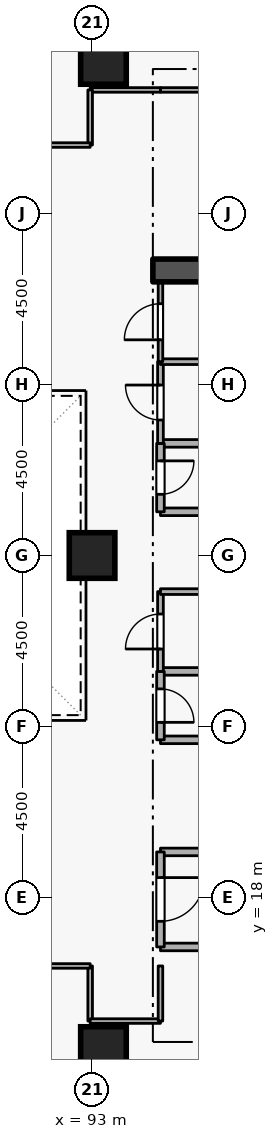
"""IFC4 building model, lengths in metres.
Left out: names, types, materials, properties, quantities, classifications, styles, units other than length and angle.
Written with IfcOpenShell. Run it as: python <this file> out.ifc"""

import sys

from ifc_helpers import new_model, si_unit, direction, frame, frame_2d, origin, origin_2d, place, context, subcontext, project, spatial, rectangle, extrude, element, fill, save


model = new_model("IFC4")
c1 = context("Model", 3, precision=1e-05, world=origin(), true_north=direction((0.0, 1.0)))
c2 = subcontext(c1, "Body", "Model", "MODEL_VIEW")
j1 = project(units=[si_unit("LENGTHUNIT", "METRE"), si_unit("PLANEANGLEUNIT", "RADIAN")], contexts=[c1])
p1 = place(None, origin())
s1 = spatial("IfcSite", under=j1, at=p1, CompositionType="ELEMENT")
p2 = place(p1, origin())
s2 = spatial("IfcBuilding", under=s1, at=p2, CompositionType="ELEMENT")
p3 = place(p2, frame((0.0, 0.0, 98.1)))
s3 = spatial("IfcBuildingStorey", under=s2, at=p3, CompositionType="ELEMENT", Elevation=98.1)
p4 = place(p3, frame((94.6, 34.5, 0.0), z_axis=(0.0, 0.0, 1.0), x_axis=(1.0, 0.0, 0.0)))
e1 = element("IfcWall", 1, at=p4, inside=s3, PredefinedType="SHEAR", context=c2, shape_type="SweptSolid", body=[
    extrude(rectangle(XDim=5.7, YDim=0.6, at=frame_2d((2.85, 0.0))), origin(), (0.0, 0.0, 1.0), 3.6),
])
for number, where, z_axis, x_axis in (
    (2, (93.3, 14.0, 0.0), (0.0, 0.0, 1.0), (1.0, 0.0, 0.0)),
    (3, (93.3, 40.0, 0.0), (0.0, 0.0, 1.0), (1.0, 0.0, 0.0)),
    (4, (93.0, 27.0, 0.0), (0.0, 0.0, 1.0), (1.0, 0.0, 0.0)),
):
    element("IfcColumn", number, at=place(p3, frame(where, z_axis=z_axis, x_axis=x_axis)), inside=s3, PredefinedType="COLUMN", context=c2, shape_type="SweptSolid", body=[
        extrude(rectangle(XDim=1.2, YDim=1.2, at=origin_2d()), origin(), (0.0, 0.0, 1.0), 3.6),
    ])
p5 = place(p3, frame((94.8, 16.7, 0.0), z_axis=(0.0, 0.0, 1.0), x_axis=(1.0, 0.0, 0.0)))
e5 = element("IfcWall", 5, at=p5, inside=s3, PredefinedType="STANDARD", context=c2, shape_type="SweptSolid", body=[
    extrude(rectangle(XDim=5.7, YDim=0.2, at=frame_2d((2.85, 0.0))), origin(), (0.0, 0.0, 1.0), 3.3),
])
p6 = place(p3, frame((97.1, 19.2, 0.0), z_axis=(0.0, 0.0, 1.0), x_axis=(-1.0, 0.0, 0.0)))
e6 = element("IfcWall", 6, at=p6, inside=s3, PredefinedType="STANDARD", context=c2, shape_type="SweptSolid", body=[
    extrude(rectangle(XDim=2.3, YDim=0.2, at=frame_2d((1.15, 0.0))), origin(), (0.0, 0.0, 1.0), 2.505),
])
p7 = place(p3, frame((94.8, 19.2, 0.0), z_axis=(0.0, 0.0, 1.0), x_axis=(0.0, -1.0, 0.0)))
e7 = element("IfcWall", 7, at=p7, inside=s3, PredefinedType="STANDARD", context=c2, shape_type="SweptSolid", body=[
    extrude(rectangle(XDim=2.5, YDim=0.2, at=frame_2d((1.25, 0.0))), origin(), (0.0, 0.0, 1.0), 3.3),
])
p8 = place(p7, frame((0.675, 0.0, 0.0)))
e8 = element("IfcOpeningElement", 8, at=p8, cuts=e7, PredefinedType="OPENING", context=c2, shape_type="SweptSolid", body=[
    extrude(rectangle(XDim=1.15, YDim=2.1, at=frame_2d((0.575, 1.05))), frame((0.0, 0.11, 0.0), z_axis=(0.0, -1.0, 0.0), x_axis=(1.0, 0.0, 0.0)), (0.0, 0.0, 1.0), 0.22),
])
for number, where, z_axis, x_axis in (
    (9, (94.8, 28.15, 0.0), (0.0, 0.0, 1.0), (1.0, 0.0, 0.0)),
    (10, (96.85, 29.95, 0.0), (0.0, 0.0, 1.0), (-1.0, 0.0, 0.0)),
):
    element("IfcWall", number, at=place(p3, frame(where, z_axis=z_axis, x_axis=x_axis)), inside=s3, PredefinedType="STANDARD", context=c2, shape_type="SweptSolid", body=[
        extrude(rectangle(XDim=2.05, YDim=0.2, at=frame_2d((1.025, 0.0))), origin(), (0.0, 0.0, 1.0), 3.3),
    ])
p9 = place(p3, frame((94.8, 29.95, 0.0), z_axis=(0.0, 0.0, 1.0), x_axis=(0.0, -1.0, 0.0)))
e11 = element("IfcWall", 11, at=p9, inside=s3, PredefinedType="STANDARD", context=c2, shape_type="SweptSolid", body=[
    extrude(rectangle(XDim=1.8, YDim=0.2, at=frame_2d((0.9, 0.0))), origin(), (0.0, 0.0, 1.0), 3.3),
])
p10 = place(p9, frame((0.46, 0.0, 0.0)))
e12 = element("IfcOpeningElement", 12, at=p10, cuts=e11, PredefinedType="OPENING", context=c2, shape_type="SweptSolid", body=[
    extrude(rectangle(XDim=0.88, YDim=2.04, at=frame_2d((0.44, 1.02))), frame((0.0, 0.11, 0.0), z_axis=(0.0, -1.0, 0.0), x_axis=(1.0, 0.0, 0.0)), (0.0, 0.0, 1.0), 0.22),
])
for number, where, z_axis, x_axis in (
    (13, (94.8, 22.15, 0.0), (0.0, 0.0, 1.0), (1.0, 0.0, 0.0)),
    (14, (96.85, 23.95, 0.0), (0.0, 0.0, 1.0), (-1.0, 0.0, 0.0)),
):
    element("IfcWall", number, at=place(p3, frame(where, z_axis=z_axis, x_axis=x_axis)), inside=s3, PredefinedType="STANDARD", context=c2, shape_type="SweptSolid", body=[
        extrude(rectangle(XDim=2.05, YDim=0.2, at=frame_2d((1.025, 0.0))), origin(), (0.0, 0.0, 1.0), 3.3),
    ])
p11 = place(p3, frame((94.8, 23.95, 0.0), z_axis=(0.0, 0.0, 1.0), x_axis=(0.0, -1.0, 0.0)))
e15 = element("IfcWall", 15, at=p11, inside=s3, PredefinedType="STANDARD", context=c2, shape_type="SweptSolid", body=[
    extrude(rectangle(XDim=1.8, YDim=0.2, at=frame_2d((0.9, 0.0))), origin(), (0.0, 0.0, 1.0), 3.3),
])
p12 = place(p11, frame((0.46, 0.0, 0.0)))
e16 = element("IfcOpeningElement", 16, at=p12, cuts=e15, PredefinedType="OPENING", context=c2, shape_type="SweptSolid", body=[
    extrude(rectangle(XDim=0.88, YDim=2.04, at=frame_2d((0.44, 1.02))), frame((0.0, 0.11, 0.0), z_axis=(0.0, -1.0, 0.0), x_axis=(1.0, 0.0, 0.0)), (0.0, 0.0, 1.0), 0.22),
])
p13 = place(p3, frame((94.8, 23.95, 0.0), z_axis=(0.0, 0.0, 1.0), x_axis=(0.0, 1.0, 0.0)))
e17 = element("IfcWall", 17, at=p13, inside=s3, PredefinedType="PARTITIONING", context=c2, shape_type="SweptSolid", body=[
    extrude(rectangle(XDim=2.1, YDim=0.15, at=frame_2d((1.05, 0.0))), origin(), (0.0, 0.0, 1.0), 3.3),
])
p14 = place(p13, frame((0.59, 0.0, 0.0)))
e18 = element("IfcOpeningElement", 18, at=p14, cuts=e17, PredefinedType="OPENING", context=c2, shape_type="SweptSolid", body=[
    extrude(rectangle(XDim=0.92, YDim=2.08, at=frame_2d((0.46, 1.04))), frame((0.0, 0.085, 0.0), z_axis=(0.0, -1.0, 0.0), x_axis=(1.0, 0.0, 0.0)), (0.0, 0.0, 1.0), 0.17),
])
p15 = place(p3, frame((94.8, 26.05, 0.0), z_axis=(0.0, 0.0, 1.0), x_axis=(1.0, 0.0, 0.0)))
e19 = element("IfcWall", 19, at=p15, inside=s3, PredefinedType="PARTITIONING", context=c2, shape_type="SweptSolid", body=[
    extrude(rectangle(XDim=2.05, YDim=0.15, at=frame_2d((1.025, 0.0))), origin(), (0.0, 0.0, 1.0), 3.3),
])
p16 = place(p3, frame((94.8, 29.95, 0.0), z_axis=(0.0, 0.0, 1.0), x_axis=(0.0, 1.0, 0.0)))
e20 = element("IfcWall", 20, at=p16, inside=s3, PredefinedType="PARTITIONING", context=c2, shape_type="SweptSolid", body=[
    extrude(rectangle(XDim=2.15, YDim=0.15, at=frame_2d((1.075, 0.0))), origin(), (0.0, 0.0, 1.0), 3.3),
])
p17 = place(p16, frame((0.615, 0.0, 0.0)))
e21 = element("IfcOpeningElement", 21, at=p17, cuts=e20, PredefinedType="OPENING", context=c2, shape_type="SweptSolid", body=[
    extrude(rectangle(XDim=0.92, YDim=2.08, at=frame_2d((0.46, 1.04))), frame((0.0, 0.085, 0.0), z_axis=(0.0, -1.0, 0.0), x_axis=(1.0, 0.0, 0.0)), (0.0, 0.0, 1.0), 0.17),
])
p18 = place(p3, frame((94.8, 32.1, 0.0), z_axis=(0.0, 0.0, 1.0), x_axis=(1.0, 0.0, 0.0)))
e22 = element("IfcWall", 22, at=p18, inside=s3, PredefinedType="PARTITIONING", context=c2, shape_type="SweptSolid", body=[
    extrude(rectangle(XDim=2.05, YDim=0.15, at=frame_2d((1.025, 0.0))), origin(), (0.0, 0.0, 1.0), 3.3),
])
p19 = place(p3, frame((94.8, 32.1, 0.0), z_axis=(0.0, 0.0, 1.0), x_axis=(0.0, 1.0, 0.0)))
e23 = element("IfcWall", 23, at=p19, inside=s3, PredefinedType="PARTITIONING", context=c2, shape_type="SweptSolid", body=[
    extrude(rectangle(XDim=2.1, YDim=0.12, at=frame_2d((1.05, 0.0))), origin(), (0.0, 0.0, 1.0), 3.3),
])
p20 = place(p19, frame((0.575, 0.0, 0.0)))
e24 = element("IfcOpeningElement", 24, at=p20, cuts=e23, PredefinedType="OPENING", context=c2, shape_type="SweptSolid", body=[
    extrude(rectangle(XDim=0.95, YDim=2.1, at=frame_2d((0.475, 1.05))), frame((0.0, 0.07, 0.0), z_axis=(0.0, -1.0, 0.0), x_axis=(1.0, 0.0, 0.0)), (0.0, 0.0, 1.0), 0.14),
])
p21 = place(p3, frame((92.95, 16.2, 0.0), z_axis=(0.0, 0.0, 1.0), x_axis=(0.0, -1.0, 0.0)))
e25 = element("IfcWall", 25, at=p21, inside=s3, PredefinedType="PARTITIONING", context=c2, shape_type="SweptSolid", body=[
    extrude(rectangle(XDim=1.45, YDim=0.12, at=frame_2d((0.725, 0.0))), origin(), (0.0, 0.0, 1.0), 3.3),
])
p22 = place(p3, frame((92.95, 14.75, 0.0), z_axis=(0.0, 0.0, 1.0), x_axis=(1.0, 0.0, 0.0)))
e26 = element("IfcWall", 26, at=p22, inside=s3, PredefinedType="PARTITIONING", context=c2, shape_type="SweptSolid", body=[
    extrude(rectangle(XDim=1.85, YDim=0.12, at=frame_2d((0.925, 0.0))), origin(), (0.0, 0.0, 1.0), 3.3),
])
p23 = place(p3, frame((94.8, 14.75, 0.0), z_axis=(0.0, 0.0, 1.0), x_axis=(0.0, 1.0, 0.0)))
e27 = element("IfcWall", 27, at=p23, inside=s3, PredefinedType="PARTITIONING", context=c2, shape_type="SweptSolid", body=[
    extrude(rectangle(XDim=1.45, YDim=0.12, at=frame_2d((0.725, 0.0))), origin(), (0.0, 0.0, 1.0), 3.3),
])
p24 = place(p3, frame((88.5, 16.2, 0.0), z_axis=(0.0, 0.0, 1.0), x_axis=(1.0, 0.0, 0.0)))
e28 = element("IfcWall", 28, at=p24, inside=s3, PredefinedType="PARTITIONING", context=c2, shape_type="SweptSolid", body=[
    extrude(rectangle(XDim=4.45, YDim=0.12, at=frame_2d((2.225, 0.0))), origin(), (0.0, 0.0, 1.0), 3.3),
])
p25 = place(p24, frame((1.7, 0.0, 0.0)))
e29 = element("IfcOpeningElement", 29, at=p25, cuts=e28, PredefinedType="OPENING", context=c2, shape_type="SweptSolid", body=[
    extrude(rectangle(XDim=1.05, YDim=2.1, at=frame_2d((0.525, 1.05))), frame((0.0, 0.07, 0.0), z_axis=(0.0, -1.0, 0.0), x_axis=(1.0, 0.0, 0.0)), (0.0, 0.0, 1.0), 0.14),
])
p26 = place(p3, frame((97.95, 39.25, 0.0), z_axis=(0.0, 0.0, 1.0), x_axis=(-1.0, 0.0, 0.0)))
e30 = element("IfcWall", 30, at=p26, inside=s3, PredefinedType="PARTITIONING", context=c2, shape_type="SweptSolid", body=[
    extrude(rectangle(XDim=3.15, YDim=0.12, at=frame_2d((1.575, 0.0))), origin(), (0.0, 0.0, 1.0), 3.3),
])
p27 = place(p3, frame((94.8, 39.25, 0.0), z_axis=(0.0, 0.0, 1.0), x_axis=(-1.0, 0.0, 0.0)))
e31 = element("IfcWall", 31, at=p27, inside=s3, PredefinedType="PARTITIONING", context=c2, shape_type="SweptSolid", body=[
    extrude(rectangle(XDim=1.85, YDim=0.12, at=frame_2d((0.925, 0.0))), origin(), (0.0, 0.0, 1.0), 3.3),
])
p28 = place(p3, frame((92.95, 39.25, 0.0), z_axis=(0.0, 0.0, 1.0), x_axis=(0.0, -1.0, 0.0)))
e32 = element("IfcWall", 32, at=p28, inside=s3, PredefinedType="PARTITIONING", context=c2, shape_type="SweptSolid", body=[
    extrude(rectangle(XDim=1.45, YDim=0.12, at=frame_2d((0.725, 0.0))), origin(), (0.0, 0.0, 1.0), 3.3),
])
p29 = place(p3, frame((92.95, 37.8, 0.0), z_axis=(0.0, 0.0, 1.0), x_axis=(-1.0, 0.0, 0.0)))
e33 = element("IfcWall", 33, at=p29, inside=s3, PredefinedType="PARTITIONING", context=c2, shape_type="SweptSolid", body=[
    extrude(rectangle(XDim=4.45, YDim=0.12, at=frame_2d((2.225, 0.0))), origin(), (0.0, 0.0, 1.0), 3.3),
])
p30 = place(p29, frame((1.7, 0.0, 0.0)))
e34 = element("IfcOpeningElement", 34, at=p30, cuts=e33, PredefinedType="OPENING", context=c2, shape_type="SweptSolid", body=[
    extrude(rectangle(XDim=1.05, YDim=2.1, at=frame_2d((0.525, 1.05))), frame((0.0, 0.07, 0.0), z_axis=(0.0, -1.0, 0.0), x_axis=(1.0, 0.0, 0.0)), (0.0, 0.0, 1.0), 0.14),
])
p31 = place(p8, origin())
e35 = element("IfcDoor", 35, at=p31, inside=s3, OperationType="SINGLE_SWING_LEFT", PredefinedType="DOOR", context=c2, shape_type="SweptSolid", body=[
    extrude(rectangle(XDim=1.15, YDim=2.1, at=frame_2d((0.575, 1.05))), frame((0.0, 0.025, 0.0), z_axis=(0.0, -1.0, 0.0), x_axis=(1.0, 0.0, 0.0)), (0.0, 0.0, 1.0), 0.05),
])
fill(e8, e35)
p32 = place(p10, origin())
e36 = element("IfcDoor", 36, at=p32, inside=s3, OperationType="SINGLE_SWING_LEFT", PredefinedType="DOOR", context=c2, shape_type="SweptSolid", body=[
    extrude(rectangle(XDim=0.88, YDim=2.04, at=frame_2d((0.44, 1.02))), frame((0.0, 0.025, 0.0), z_axis=(0.0, -1.0, 0.0), x_axis=(1.0, 0.0, 0.0)), (0.0, 0.0, 1.0), 0.05),
])
fill(e12, e36)
p33 = place(p12, origin())
e37 = element("IfcDoor", 37, at=p33, inside=s3, OperationType="SINGLE_SWING_RIGHT", PredefinedType="DOOR", context=c2, shape_type="SweptSolid", body=[
    extrude(rectangle(XDim=0.88, YDim=2.04, at=frame_2d((0.44, 1.02))), frame((0.0, 0.025, 0.0), z_axis=(0.0, -1.0, 0.0), x_axis=(1.0, 0.0, 0.0)), (0.0, 0.0, 1.0), 0.05),
])
fill(e16, e37)
p34 = place(p14, origin())
e38 = element("IfcDoor", 38, at=p34, inside=s3, OperationType="SINGLE_SWING_LEFT", PredefinedType="DOOR", context=c2, shape_type="SweptSolid", body=[
    extrude(rectangle(XDim=0.92, YDim=2.08, at=frame_2d((0.46, 1.04))), frame((0.0, 0.025, 0.0), z_axis=(0.0, -1.0, 0.0), x_axis=(1.0, 0.0, 0.0)), (0.0, 0.0, 1.0), 0.05),
])
fill(e18, e38)
p35 = place(p17, origin())
e39 = element("IfcDoor", 39, at=p35, inside=s3, OperationType="SINGLE_SWING_RIGHT", PredefinedType="DOOR", context=c2, shape_type="SweptSolid", body=[
    extrude(rectangle(XDim=0.92, YDim=2.08, at=frame_2d((0.46, 1.04))), frame((0.0, 0.025, 0.0), z_axis=(0.0, -1.0, 0.0), x_axis=(1.0, 0.0, 0.0)), (0.0, 0.0, 1.0), 0.05),
])
fill(e21, e39)
p36 = place(p20, origin())
e40 = element("IfcDoor", 40, at=p36, inside=s3, OperationType="SINGLE_SWING_LEFT", PredefinedType="DOOR", context=c2, shape_type="SweptSolid", body=[
    extrude(rectangle(XDim=0.95, YDim=2.1, at=frame_2d((0.475, 1.05))), frame((0.0, 0.025, 0.0), z_axis=(0.0, -1.0, 0.0), x_axis=(1.0, 0.0, 0.0)), (0.0, 0.0, 1.0), 0.05),
])
fill(e24, e40)
save(model, sys.argv[1])
